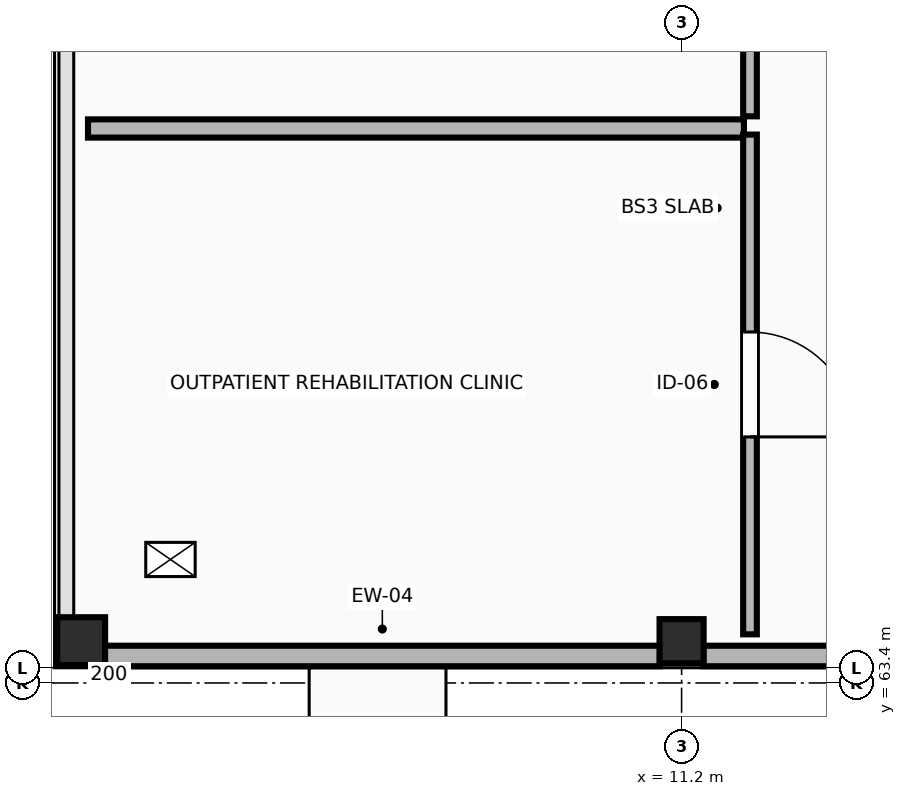
"""IFC4 building model, lengths in metres.
Left out: names, types, materials, properties, quantities, classifications, styles, units other than length and angle.
Written with IfcOpenShell. Run it as: python <this file> out.ifc"""

import sys

from ifc_helpers import new_model, si_unit, direction, frame, frame_2d, origin, origin_2d, place, context, subcontext, project, spatial, rectangle, extrude, element, fill, save


model = new_model("IFC4")
c1 = context("Model", 3, precision=1e-05, world=origin(), true_north=direction((0.0, 1.0)))
c2 = subcontext(c1, "Body", "Model", "MODEL_VIEW")
j1 = project(units=[si_unit("LENGTHUNIT", "METRE"), si_unit("PLANEANGLEUNIT", "RADIAN")], contexts=[c1])
p1 = place(None, origin())
s1 = spatial("IfcSite", under=j1, at=p1, CompositionType="ELEMENT")
p2 = place(p1, origin())
s2 = spatial("IfcBuilding", under=s1, at=p2, CompositionType="ELEMENT")
p3 = place(p2, origin())
s3 = spatial("IfcBuildingStorey", under=s2, at=p3, CompositionType="ELEMENT", Elevation=0.0)
p4 = place(p3, frame((3.3, 63.95, -1.75), z_axis=(0.0, 0.0, 1.0), x_axis=(1.0, 0.0, 0.0)))
e1 = element("IfcColumn", 1, at=p4, inside=s3, PredefinedType="COLUMN", context=c2, shape_type="SweptSolid", body=[
    extrude(rectangle(XDim=0.63, YDim=0.63, at=origin_2d()), origin(), (0.0, 0.0, 1.0), 7.15),
])
p5 = place(p3, frame((11.2, 63.95, -1.75), z_axis=(0.0, 0.0, 1.0), x_axis=(1.0, 0.0, 0.0)))
e2 = element("IfcColumn", 2, at=p5, inside=s3, PredefinedType="COLUMN", context=c2, shape_type="SweptSolid", body=[
    extrude(rectangle(XDim=0.58, YDim=0.58, at=origin_2d()), origin(), (0.0, 0.0, 1.0), 7.15),
])
p6 = place(p3, frame((3.61, 63.755, 0.0), z_axis=(0.0, 0.0, 1.0), x_axis=(1.0, 0.0, 0.0)))
e3 = element("IfcWall", 3, at=p6, inside=s3, PredefinedType="STANDARD", context=c2, shape_type="SweptSolid", body=[
    extrude(rectangle(XDim=7.305, YDim=0.27, at=frame_2d((3.652, 0.0))), origin(), (0.0, 0.0, 1.0), 5.05),
])
p7 = place(p3, frame((11.485, 63.755, 0.0), z_axis=(0.0, 0.0, 1.0), x_axis=(1.0, 0.0, 0.0)))
e4 = element("IfcWall", 4, at=p7, inside=s3, PredefinedType="STANDARD", context=c2, shape_type="SweptSolid", body=[
    extrude(rectangle(XDim=7.885, YDim=0.27, at=frame_2d((3.942, 0.0))), origin(), (0.0, 0.0, 1.0), 5.05),
])
p8 = place(p3, frame((3.39, 70.696, 0.0), z_axis=(0.0, 0.0, 1.0), x_axis=(1.0, 0.0, 0.0)))
e5 = element("IfcWall", 5, at=p8, inside=s3, PredefinedType="PARTITIONING", context=c2, shape_type="SweptSolid", body=[
    extrude(rectangle(XDim=8.63, YDim=0.24, at=frame_2d((4.315, 0.0))), origin(), (0.0, 0.0, 1.0), 5.05),
])
p9 = place(p3, frame((12.1, 70.616, 0.0), z_axis=(0.0, 0.0, 1.0), x_axis=(0.0, -1.0, 0.0)))
e6 = element("IfcWall", 6, at=p9, inside=s3, PredefinedType="PARTITIONING", context=c2, shape_type="SweptSolid", body=[
    extrude(rectangle(XDim=6.576, YDim=0.18, at=frame_2d((3.288, 0.0))), origin(), (0.0, 0.0, 1.0), 5.05),
])
p10 = place(p9, frame((2.598, 0.0, 0.0)))
e7 = element("IfcOpeningElement", 7, at=p10, cuts=e6, PredefinedType="OPENING", context=c2, shape_type="SweptSolid", body=[
    extrude(rectangle(XDim=1.38, YDim=2.25, at=frame_2d((0.69, 1.125))), frame((0.0, 0.1, 0.0), z_axis=(0.0, -1.0, 0.0), x_axis=(1.0, 0.0, 0.0)), (0.0, 0.0, 1.0), 0.2),
])
p11 = place(p3, frame((12.1, 77.391, 0.0), z_axis=(0.0, 0.0, 1.0), x_axis=(0.0, -1.0, 0.0)))
e8 = element("IfcWall", 8, at=p11, inside=s3, PredefinedType="PARTITIONING", context=c2, shape_type="SweptSolid", body=[
    extrude(rectangle(XDim=6.536, YDim=0.18, at=frame_2d((3.268, 0.0))), origin(), (0.0, 0.0, 1.0), 5.05),
])
p12 = place(p11, frame((2.158, 0.0, 0.0)))
e9 = element("IfcOpeningElement", 9, at=p12, cuts=e8, PredefinedType="OPENING", context=c2, shape_type="SweptSolid", body=[
    extrude(rectangle(XDim=1.22, YDim=2.18, at=frame_2d((0.61, 1.09))), frame((0.0, 0.1, 0.0), z_axis=(0.0, -1.0, 0.0), x_axis=(1.0, 0.0, 0.0)), (0.0, 0.0, 1.0), 0.2),
])
p13 = place(p10, origin())
e10 = element("IfcDoor", 10, at=p13, inside=s3, OperationType="SINGLE_SWING_RIGHT", PredefinedType="DOOR", context=c2, shape_type="SweptSolid", body=[
    extrude(rectangle(XDim=1.38, YDim=2.25, at=frame_2d((0.69, 1.125))), frame((0.0, 0.025, 0.0), z_axis=(0.0, -1.0, 0.0), x_axis=(1.0, 0.0, 0.0)), (0.0, 0.0, 1.0), 0.05),
])
fill(e7, e10)
save(model, sys.argv[1])
